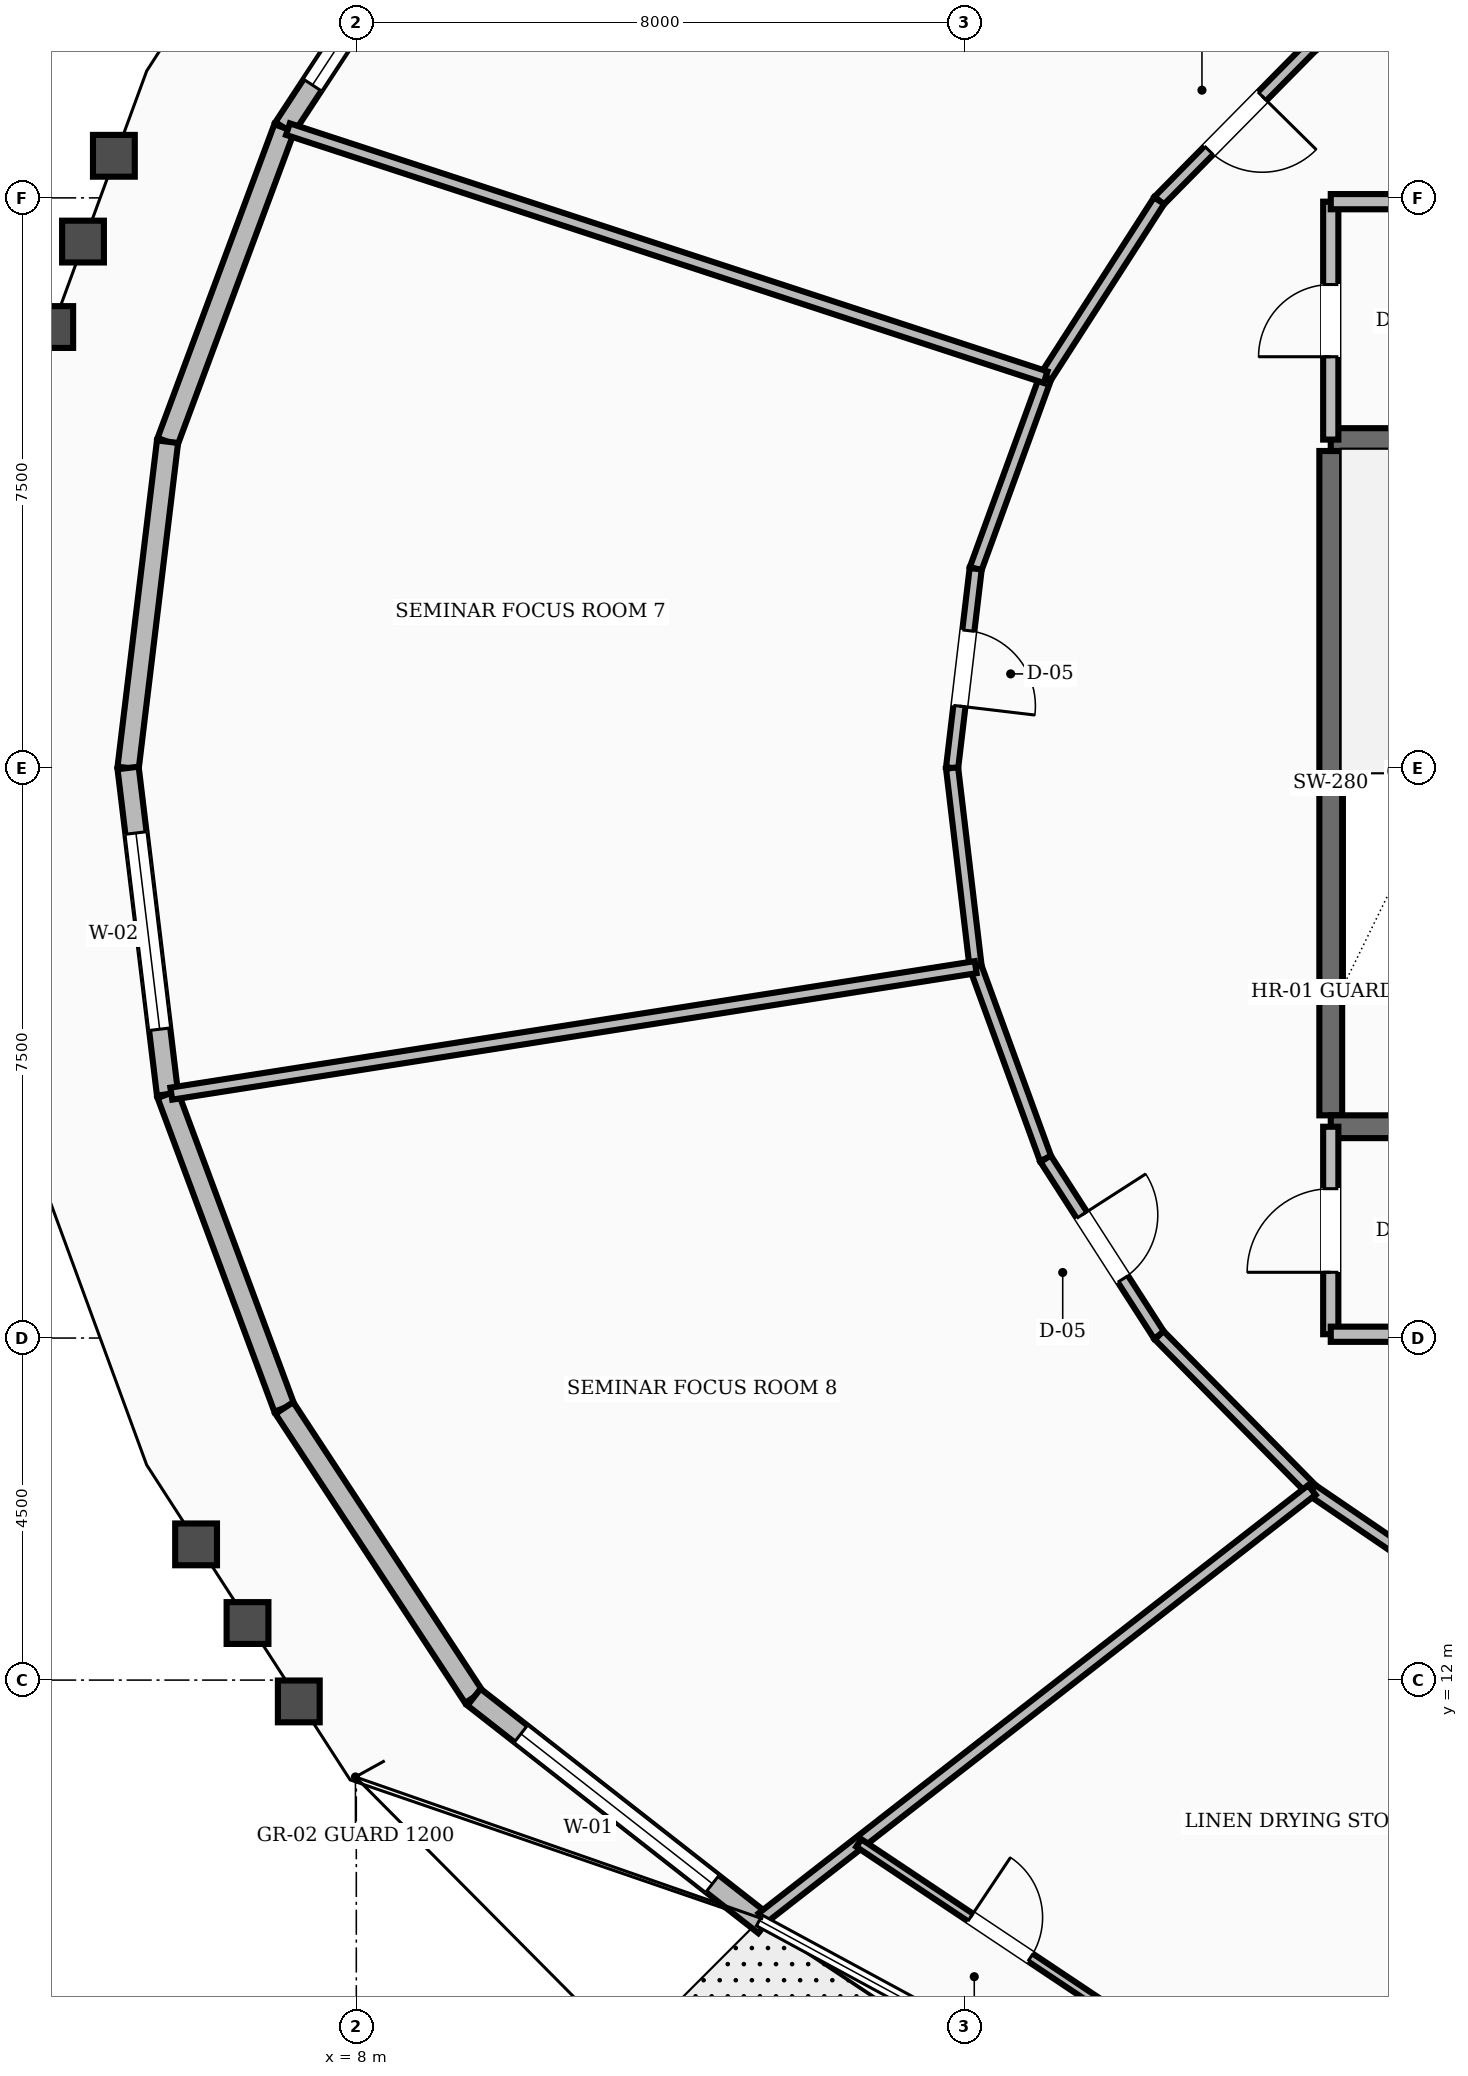
"""IFC4 building model, lengths in metres.
Left out: names, types, materials, properties, quantities, classifications, styles, units other than length and angle.
Written with IfcOpenShell. Run it as: python <this file> out.ifc"""

import sys

from ifc_helpers import new_model, si_unit, direction, frame, frame_2d, origin, place, context, subcontext, project, spatial, rectangle, extrude, element, fill, save


model = new_model("IFC4")
c1 = context("Model", 3, precision=1e-05, world=origin(), true_north=direction((0.0, 1.0)))
c2 = subcontext(c1, "Body", "Model", "MODEL_VIEW")
j1 = project(units=[si_unit("LENGTHUNIT", "METRE"), si_unit("PLANEANGLEUNIT", "RADIAN")], contexts=[c1])
p1 = place(None, origin())
s1 = spatial("IfcSite", under=j1, at=p1, CompositionType="ELEMENT")
p2 = place(p1, origin())
s2 = spatial("IfcBuilding", under=s1, at=p2, CompositionType="ELEMENT")
p3 = place(p2, frame((0.0, 0.0, 73.6)))
s3 = spatial("IfcBuildingStorey", under=s2, at=p3, CompositionType="ELEMENT", Elevation=73.6)
p4 = place(p3, frame((20.82, 19.43, 0.0), z_axis=(0.0, 0.0, 1.0), x_axis=(0.0, 1.0, 0.0)))
e1 = element("IfcWall", 1, at=p4, inside=s3, PredefinedType="SHEAR", context=c2, shape_type="SweptSolid", body=[
    extrude(rectangle(XDim=8.74, YDim=0.3, at=frame_2d((4.37, 0.0))), origin(), (0.0, 0.0, 1.0), 3.6),
])
p5 = place(p3, frame((20.82, 19.28, 0.0), z_axis=(0.0, 0.0, 1.0), x_axis=(1.0, 0.0, 0.0)))
e2 = element("IfcWall", 2, at=p5, inside=s3, PredefinedType="SHEAR", context=c2, shape_type="SweptSolid", body=[
    extrude(rectangle(XDim=3.6, YDim=0.3, at=frame_2d((1.8, 0.0))), origin(), (0.0, 0.0, 1.0), 3.6),
])
p6 = place(p5, frame((1.3, 0.0, 0.0)))
e3 = element("IfcOpeningElement", 3, at=p6, cuts=e2, PredefinedType="OPENING", context=c2, shape_type="SweptSolid", body=[
    extrude(rectangle(XDim=1.1, YDim=2.1, at=frame_2d((0.55, 1.05))), frame((0.0, 0.16, 0.0), z_axis=(0.0, -1.0, 0.0), x_axis=(1.0, 0.0, 0.0)), (0.0, 0.0, 1.0), 0.32),
])
p7 = place(p3, frame((20.82, 28.32, 0.0), z_axis=(0.0, 0.0, 1.0), x_axis=(1.0, 0.0, 0.0)))
e4 = element("IfcWall", 4, at=p7, inside=s3, PredefinedType="SHEAR", context=c2, shape_type="SweptSolid", body=[
    extrude(rectangle(XDim=3.6, YDim=0.3, at=frame_2d((1.8, 0.0))), origin(), (0.0, 0.0, 1.0), 3.6),
])
p8 = place(p3, frame((9.548, 36.224, 0.0), z_axis=(0.0, 0.0, 1.0), x_axis=(-0.548505219405, -0.836147130765, 0.0)))
e5 = element("IfcWall", 5, at=p8, inside=s3, PredefinedType="STANDARD", context=c2, shape_type="SweptSolid", body=[
    extrude(rectangle(XDim=4.549, YDim=0.28, at=frame_2d((2.275, 0.0))), origin(), (0.0, 0.0, 1.0), 2.71),
])
p9 = place(p8, frame((0.675, 0.0, 0.8)))
e6 = element("IfcOpeningElement", 6, at=p9, cuts=e5, PredefinedType="OPENING", context=c2, shape_type="SweptSolid", body=[
    extrude(rectangle(XDim=3.2, YDim=1.65, at=frame_2d((1.6, 0.825))), frame((0.0, 0.15, 0.0), z_axis=(0.0, -1.0, 0.0), x_axis=(1.0, 0.0, 0.0)), (0.0, 0.0, 1.0), 0.3),
])
p10 = place(p3, frame((7.053, 32.42, 0.0), z_axis=(0.0, 0.0, 1.0), x_axis=(-0.348899033007, -0.937160319672, 0.0)))
e7 = element("IfcWall", 7, at=p10, inside=s3, PredefinedType="STANDARD", context=c2, shape_type="SweptSolid", body=[
    extrude(rectangle(XDim=4.404, YDim=0.28, at=frame_2d((2.202, 0.0))), origin(), (0.0, 0.0, 1.0), 2.71),
])
p11 = place(p3, frame((5.516, 28.292, 0.0), z_axis=(0.0, 0.0, 1.0), x_axis=(-0.119989041881, -0.992775216164, 0.0)))
e8 = element("IfcWall", 8, at=p11, inside=s3, PredefinedType="STANDARD", context=c2, shape_type="SweptSolid", body=[
    extrude(rectangle(XDim=4.324, YDim=0.28, at=frame_2d((2.162, 0.0))), origin(), (0.0, 0.0, 1.0), 2.71),
])
p12 = place(p3, frame((4.998, 24.0, 0.0), z_axis=(0.0, 0.0, 1.0), x_axis=(0.119989041881, -0.992775216164, 0.0)))
e9 = element("IfcWall", 9, at=p12, inside=s3, PredefinedType="STANDARD", context=c2, shape_type="SweptSolid", body=[
    extrude(rectangle(XDim=4.324, YDim=0.28, at=frame_2d((2.162, 0.0))), origin(), (0.0, 0.0, 1.0), 2.71),
])
p13 = place(p12, frame((0.862, 0.0, 0.8)))
e10 = element("IfcOpeningElement", 10, at=p13, cuts=e9, PredefinedType="OPENING", context=c2, shape_type="SweptSolid", body=[
    extrude(rectangle(XDim=2.6, YDim=1.65, at=frame_2d((1.3, 0.825))), frame((0.0, 0.15, 0.0), z_axis=(0.0, -1.0, 0.0), x_axis=(1.0, 0.0, 0.0)), (0.0, 0.0, 1.0), 0.3),
])
p14 = place(p3, frame((5.516, 19.708, 0.0), z_axis=(0.0, 0.0, 1.0), x_axis=(0.348899033007, -0.937160319672, 0.0)))
e11 = element("IfcWall", 11, at=p14, inside=s3, PredefinedType="STANDARD", context=c2, shape_type="SweptSolid", body=[
    extrude(rectangle(XDim=4.404, YDim=0.28, at=frame_2d((2.202, 0.0))), origin(), (0.0, 0.0, 1.0), 2.71),
])
p15 = place(p3, frame((7.053, 15.58, 0.0), z_axis=(0.0, 0.0, 1.0), x_axis=(0.548505219405, -0.836147130765, 0.0)))
e12 = element("IfcWall", 12, at=p15, inside=s3, PredefinedType="STANDARD", context=c2, shape_type="SweptSolid", body=[
    extrude(rectangle(XDim=4.549, YDim=0.28, at=frame_2d((2.275, 0.0))), origin(), (0.0, 0.0, 1.0), 2.71),
])
p16 = place(p3, frame((9.548, 11.776, 0.0), z_axis=(0.0, 0.0, 1.0), x_axis=(0.787476373369, -0.616344839668, 0.0)))
e13 = element("IfcWall", 13, at=p16, inside=s3, PredefinedType="STANDARD", context=c2, shape_type="SweptSolid", body=[
    extrude(rectangle(XDim=4.859, YDim=0.28, at=frame_2d((2.43, 0.0))), origin(), (0.0, 0.0, 1.0), 2.71),
])
p17 = place(p16, frame((0.784, 0.0, 0.8)))
e14 = element("IfcOpeningElement", 14, at=p17, cuts=e13, PredefinedType="OPENING", context=c2, shape_type="SweptSolid", body=[
    extrude(rectangle(XDim=3.2, YDim=1.65, at=frame_2d((1.6, 0.825))), frame((0.0, 0.15, 0.0), z_axis=(0.0, -1.0, 0.0), x_axis=(1.0, 0.0, 0.0)), (0.0, 0.0, 1.0), 0.3),
])
p18 = place(p3, frame((20.82, 16.55, 0.0), z_axis=(0.0, 0.0, 1.0), x_axis=(0.0, 1.0, 0.0)))
e15 = element("IfcWall", 15, at=p18, inside=s3, PredefinedType="SOLIDWALL", context=c2, shape_type="SweptSolid", body=[
    extrude(rectangle(XDim=2.73, YDim=0.2, at=frame_2d((1.365, 0.0))), origin(), (0.0, 0.0, 1.0), 2.71),
])
p19 = place(p18, frame((0.815, 0.0, 0.0)))
e16 = element("IfcOpeningElement", 16, at=p19, cuts=e15, PredefinedType="OPENING", context=c2, shape_type="SweptSolid", body=[
    extrude(rectangle(XDim=1.1, YDim=2.1, at=frame_2d((0.55, 1.05))), frame((0.0, 0.11, 0.0), z_axis=(0.0, -1.0, 0.0), x_axis=(1.0, 0.0, 0.0)), (0.0, 0.0, 1.0), 0.22),
])
p20 = place(p3, frame((20.82, 16.55, 0.0), z_axis=(0.0, 0.0, 1.0), x_axis=(1.0, 0.0, 0.0)))
e17 = element("IfcWall", 17, at=p20, inside=s3, PredefinedType="SOLIDWALL", context=c2, shape_type="SweptSolid", body=[
    extrude(rectangle(XDim=3.98, YDim=0.2, at=frame_2d((1.99, 0.0))), origin(), (0.0, 0.0, 1.0), 2.71),
])
p21 = place(p3, frame((20.82, 28.32, 0.0), z_axis=(0.0, 0.0, 1.0), x_axis=(0.0, 1.0, 0.0)))
e18 = element("IfcWall", 18, at=p21, inside=s3, PredefinedType="SOLIDWALL", context=c2, shape_type="SweptSolid", body=[
    extrude(rectangle(XDim=3.13, YDim=0.2, at=frame_2d((1.565, 0.0))), origin(), (0.0, 0.0, 1.0), 2.71),
])
p22 = place(p21, frame((1.09, 0.0, 0.0)))
e19 = element("IfcOpeningElement", 19, at=p22, cuts=e18, PredefinedType="OPENING", context=c2, shape_type="SweptSolid", body=[
    extrude(rectangle(XDim=0.95, YDim=2.1, at=frame_2d((0.475, 1.05))), frame((0.0, 0.11, 0.0), z_axis=(0.0, -1.0, 0.0), x_axis=(1.0, 0.0, 0.0)), (0.0, 0.0, 1.0), 0.22),
])
p23 = place(p3, frame((20.82, 31.45, 0.0), z_axis=(0.0, 0.0, 1.0), x_axis=(1.0, 0.0, 0.0)))
e20 = element("IfcWall", 20, at=p23, inside=s3, PredefinedType="SOLIDWALL", context=c2, shape_type="SweptSolid", body=[
    extrude(rectangle(XDim=3.98, YDim=0.2, at=frame_2d((1.99, 0.0))), origin(), (0.0, 0.0, 1.0), 2.71),
])
p24 = place(p3, frame((20.572, 33.499, 0.0), z_axis=(0.0, 0.0, 1.0), x_axis=(-0.702569520063, -0.711615113301, 0.0)))
e21 = element("IfcWall", 21, at=p24, inside=s3, PredefinedType="SOLIDWALL", context=c2, shape_type="SweptSolid", body=[
    extrude(rectangle(XDim=2.861, YDim=0.16, at=frame_2d((1.43, 0.0))), origin(), (0.0, 0.0, 1.0), 2.71),
])
p25 = place(p24, frame((0.93, 0.0, 0.0)))
e22 = element("IfcOpeningElement", 22, at=p25, cuts=e21, PredefinedType="OPENING", context=c2, shape_type="SweptSolid", body=[
    extrude(rectangle(XDim=1.0, YDim=2.1, at=frame_2d((0.5, 1.05))), frame((0.0, 0.09, 0.0), z_axis=(0.0, -1.0, 0.0), x_axis=(1.0, 0.0, 0.0)), (0.0, 0.0, 1.0), 0.18),
])
p26 = place(p3, frame((18.562, 31.463, 0.0), z_axis=(0.0, 0.0, 1.0), x_axis=(-0.540891657444, -0.841092274907, 0.0)))
e23 = element("IfcWall", 23, at=p26, inside=s3, PredefinedType="SOLIDWALL", context=c2, shape_type="SweptSolid", body=[
    extrude(rectangle(XDim=2.761, YDim=0.16, at=frame_2d((1.38, 0.0))), origin(), (0.0, 0.0, 1.0), 2.71),
])
p27 = place(p3, frame((17.068, 29.141, 0.0), z_axis=(0.0, 0.0, 1.0), x_axis=(-0.342882618672, -0.939378257047, 0.0)))
e24 = element("IfcWall", 24, at=p27, inside=s3, PredefinedType="SOLIDWALL", context=c2, shape_type="SweptSolid", body=[
    extrude(rectangle(XDim=2.683, YDim=0.16, at=frame_2d((1.341, 0.0))), origin(), (0.0, 0.0, 1.0), 2.71),
])
p28 = place(p3, frame((16.148, 26.621, 0.0), z_axis=(0.0, 0.0, 1.0), x_axis=(-0.117667763342, -0.993053018459, 0.0)))
e25 = element("IfcWall", 25, at=p28, inside=s3, PredefinedType="SOLIDWALL", context=c2, shape_type="SweptSolid", body=[
    extrude(rectangle(XDim=2.639, YDim=0.16, at=frame_2d((1.32, 0.0))), origin(), (0.0, 0.0, 1.0), 2.71),
])
p29 = place(p28, frame((0.82, 0.0, 0.0)))
e26 = element("IfcOpeningElement", 26, at=p29, cuts=e25, PredefinedType="OPENING", context=c2, shape_type="SweptSolid", body=[
    extrude(rectangle(XDim=1.0, YDim=2.1, at=frame_2d((0.5, 1.05))), frame((0.0, 0.09, 0.0), z_axis=(0.0, -1.0, 0.0), x_axis=(1.0, 0.0, 0.0)), (0.0, 0.0, 1.0), 0.18),
])
p30 = place(p3, frame((15.838, 24.0, 0.0), z_axis=(0.0, 0.0, 1.0), x_axis=(0.117667763342, -0.993053018459, 0.0)))
e27 = element("IfcWall", 27, at=p30, inside=s3, PredefinedType="SOLIDWALL", context=c2, shape_type="SweptSolid", body=[
    extrude(rectangle(XDim=2.639, YDim=0.16, at=frame_2d((1.32, 0.0))), origin(), (0.0, 0.0, 1.0), 2.71),
])
p31 = place(p3, frame((16.148, 21.379, 0.0), z_axis=(0.0, 0.0, 1.0), x_axis=(0.342882618672, -0.939378257047, 0.0)))
e28 = element("IfcWall", 28, at=p31, inside=s3, PredefinedType="SOLIDWALL", context=c2, shape_type="SweptSolid", body=[
    extrude(rectangle(XDim=2.683, YDim=0.16, at=frame_2d((1.341, 0.0))), origin(), (0.0, 0.0, 1.0), 2.71),
])
p32 = place(p3, frame((17.068, 18.859, 0.0), z_axis=(0.0, 0.0, 1.0), x_axis=(0.540891657444, -0.841092274907, 0.0)))
e29 = element("IfcWall", 29, at=p32, inside=s3, PredefinedType="SOLIDWALL", context=c2, shape_type="SweptSolid", body=[
    extrude(rectangle(XDim=2.761, YDim=0.16, at=frame_2d((1.38, 0.0))), origin(), (0.0, 0.0, 1.0), 2.71),
])
p33 = place(p32, frame((0.881, 0.0, 0.0)))
e30 = element("IfcOpeningElement", 30, at=p33, cuts=e29, PredefinedType="OPENING", context=c2, shape_type="SweptSolid", body=[
    extrude(rectangle(XDim=1.0, YDim=2.1, at=frame_2d((0.5, 1.05))), frame((0.0, 0.09, 0.0), z_axis=(0.0, -1.0, 0.0), x_axis=(1.0, 0.0, 0.0)), (0.0, 0.0, 1.0), 0.18),
])
p34 = place(p3, frame((18.562, 16.537, 0.0), z_axis=(0.0, 0.0, 1.0), x_axis=(0.702569520063, -0.711615113301, 0.0)))
e31 = element("IfcWall", 31, at=p34, inside=s3, PredefinedType="SOLIDWALL", context=c2, shape_type="SweptSolid", body=[
    extrude(rectangle(XDim=2.861, YDim=0.16, at=frame_2d((1.43, 0.0))), origin(), (0.0, 0.0, 1.0), 2.71),
])
p35 = place(p3, frame((20.572, 14.501, 0.0), z_axis=(0.0, 0.0, 1.0), x_axis=(0.826112340767, -0.563505457323, 0.0)))
e32 = element("IfcWall", 32, at=p35, inside=s3, PredefinedType="SOLIDWALL", context=c2, shape_type="SweptSolid", body=[
    extrude(rectangle(XDim=2.965, YDim=0.16, at=frame_2d((1.482, 0.0))), origin(), (0.0, 0.0, 1.0), 2.71),
])
p36 = place(p3, frame((17.068, 29.141, 0.0), z_axis=(0.0, 0.0, 1.0), x_axis=(-0.950368850296, 0.31112545442, 0.0)))
e33 = element("IfcWall", 33, at=p36, inside=s3, PredefinedType="SOLIDWALL", context=c2, shape_type="SweptSolid", body=[
    extrude(rectangle(XDim=10.488, YDim=0.16, at=frame_2d((5.244, 0.0))), origin(), (0.0, 0.0, 1.0), 2.71),
])
p37 = place(p3, frame((16.148, 21.379, 0.0), z_axis=(0.0, 0.0, 1.0), x_axis=(-0.987864939739, -0.155315359302, 0.0)))
e34 = element("IfcWall", 34, at=p37, inside=s3, PredefinedType="SOLIDWALL", context=c2, shape_type="SweptSolid", body=[
    extrude(rectangle(XDim=10.712, YDim=0.16, at=frame_2d((5.356, 0.0))), origin(), (0.0, 0.0, 1.0), 2.71),
])
p38 = place(p3, frame((20.572, 14.501, 0.0), z_axis=(0.0, 0.0, 1.0), x_axis=(-0.788888678139, -0.614536128722, 0.0)))
e35 = element("IfcWall", 35, at=p38, inside=s3, PredefinedType="SOLIDWALL", context=c2, shape_type="SweptSolid", body=[
    extrude(rectangle(XDim=9.165, YDim=0.16, at=frame_2d((4.583, 0.0))), origin(), (0.0, 0.0, 1.0), 2.71),
])
p39 = place(p3, frame((14.611, 9.857, 0.0), z_axis=(0.0, 0.0, 1.0), x_axis=(0.831748375698, -0.555152807364, 0.0)))
e36 = element("IfcWall", 36, at=p39, inside=s3, PredefinedType="PARTITIONING", context=c2, shape_type="SweptSolid", body=[
    extrude(rectangle(XDim=4.48, YDim=0.12, at=frame_2d((2.24, 0.0))), origin(), (0.0, 0.0, 1.0), 2.71),
])
p40 = place(p39, frame((1.765, 0.0, 0.0)))
e37 = element("IfcOpeningElement", 37, at=p40, cuts=e36, PredefinedType="OPENING", context=c2, shape_type="SweptSolid", body=[
    extrude(rectangle(XDim=0.95, YDim=2.1, at=frame_2d((0.475, 1.05))), frame((0.0, 0.07, 0.0), z_axis=(0.0, -1.0, 0.0), x_axis=(1.0, 0.0, 0.0)), (0.0, 0.0, 1.0), 0.14),
])
p41 = place(p9, origin())
e38 = element("IfcWindow", 38, at=p41, inside=s3, PartitioningType="SINGLE_PANEL", PredefinedType="WINDOW", context=c2, shape_type="SweptSolid", body=[
    extrude(rectangle(XDim=3.2, YDim=1.65, at=frame_2d((1.6, 0.825))), frame((0.0, 0.03, 0.0), z_axis=(0.0, -1.0, 0.0), x_axis=(1.0, 0.0, 0.0)), (0.0, 0.0, 1.0), 0.06),
])
fill(e6, e38)
p42 = place(p13, origin())
e39 = element("IfcWindow", 39, at=p42, inside=s3, PartitioningType="SINGLE_PANEL", PredefinedType="WINDOW", context=c2, shape_type="SweptSolid", body=[
    extrude(rectangle(XDim=2.6, YDim=1.65, at=frame_2d((1.3, 0.825))), frame((0.0, 0.03, 0.0), z_axis=(0.0, -1.0, 0.0), x_axis=(1.0, 0.0, 0.0)), (0.0, 0.0, 1.0), 0.06),
])
fill(e10, e39)
p43 = place(p17, origin())
e40 = element("IfcWindow", 40, at=p43, inside=s3, PartitioningType="SINGLE_PANEL", PredefinedType="WINDOW", context=c2, shape_type="SweptSolid", body=[
    extrude(rectangle(XDim=3.2, YDim=1.65, at=frame_2d((1.6, 0.825))), frame((0.0, 0.03, 0.0), z_axis=(0.0, -1.0, 0.0), x_axis=(1.0, 0.0, 0.0)), (0.0, 0.0, 1.0), 0.06),
])
fill(e14, e40)
p44 = place(p19, origin())
e41 = element("IfcDoor", 41, at=p44, inside=s3, OperationType="SINGLE_SWING_LEFT", PredefinedType="DOOR", context=c2, shape_type="SweptSolid", body=[
    extrude(rectangle(XDim=1.1, YDim=2.1, at=frame_2d((0.55, 1.05))), frame((0.0, 0.025, 0.0), z_axis=(0.0, -1.0, 0.0), x_axis=(1.0, 0.0, 0.0)), (0.0, 0.0, 1.0), 0.05),
])
fill(e16, e41)
p45 = place(p22, origin())
e42 = element("IfcDoor", 42, at=p45, inside=s3, OperationType="SINGLE_SWING_LEFT", PredefinedType="DOOR", context=c2, shape_type="SweptSolid", body=[
    extrude(rectangle(XDim=0.95, YDim=2.1, at=frame_2d((0.475, 1.05))), frame((0.0, 0.025, 0.0), z_axis=(0.0, -1.0, 0.0), x_axis=(1.0, 0.0, 0.0)), (0.0, 0.0, 1.0), 0.05),
])
fill(e19, e42)
p46 = place(p25, origin())
e43 = element("IfcDoor", 43, at=p46, inside=s3, OperationType="SINGLE_SWING_LEFT", PredefinedType="DOOR", context=c2, shape_type="SweptSolid", body=[
    extrude(rectangle(XDim=1.0, YDim=2.1, at=frame_2d((0.5, 1.05))), frame((0.0, 0.025, 0.0), z_axis=(0.0, -1.0, 0.0), x_axis=(1.0, 0.0, 0.0)), (0.0, 0.0, 1.0), 0.05),
])
fill(e22, e43)
p47 = place(p29, origin())
e44 = element("IfcDoor", 44, at=p47, inside=s3, OperationType="SINGLE_SWING_RIGHT", PredefinedType="DOOR", context=c2, shape_type="SweptSolid", body=[
    extrude(rectangle(XDim=1.0, YDim=2.1, at=frame_2d((0.5, 1.05))), frame((0.0, 0.025, 0.0), z_axis=(0.0, -1.0, 0.0), x_axis=(1.0, 0.0, 0.0)), (0.0, 0.0, 1.0), 0.05),
])
fill(e26, e44)
p48 = place(p33, origin())
e45 = element("IfcDoor", 45, at=p48, inside=s3, OperationType="SINGLE_SWING_LEFT", PredefinedType="DOOR", context=c2, shape_type="SweptSolid", body=[
    extrude(rectangle(XDim=1.0, YDim=2.1, at=frame_2d((0.5, 1.05))), frame((0.0, 0.025, 0.0), z_axis=(0.0, -1.0, 0.0), x_axis=(1.0, 0.0, 0.0)), (0.0, 0.0, 1.0), 0.05),
])
fill(e30, e45)
p49 = place(p40, origin())
e46 = element("IfcDoor", 46, at=p49, inside=s3, OperationType="SINGLE_SWING_LEFT", PredefinedType="DOOR", context=c2, shape_type="SweptSolid", body=[
    extrude(rectangle(XDim=0.95, YDim=2.1, at=frame_2d((0.475, 1.05))), frame((0.0, 0.025, 0.0), z_axis=(0.0, -1.0, 0.0), x_axis=(1.0, 0.0, 0.0)), (0.0, 0.0, 1.0), 0.05),
])
fill(e37, e46)
save(model, sys.argv[1])
